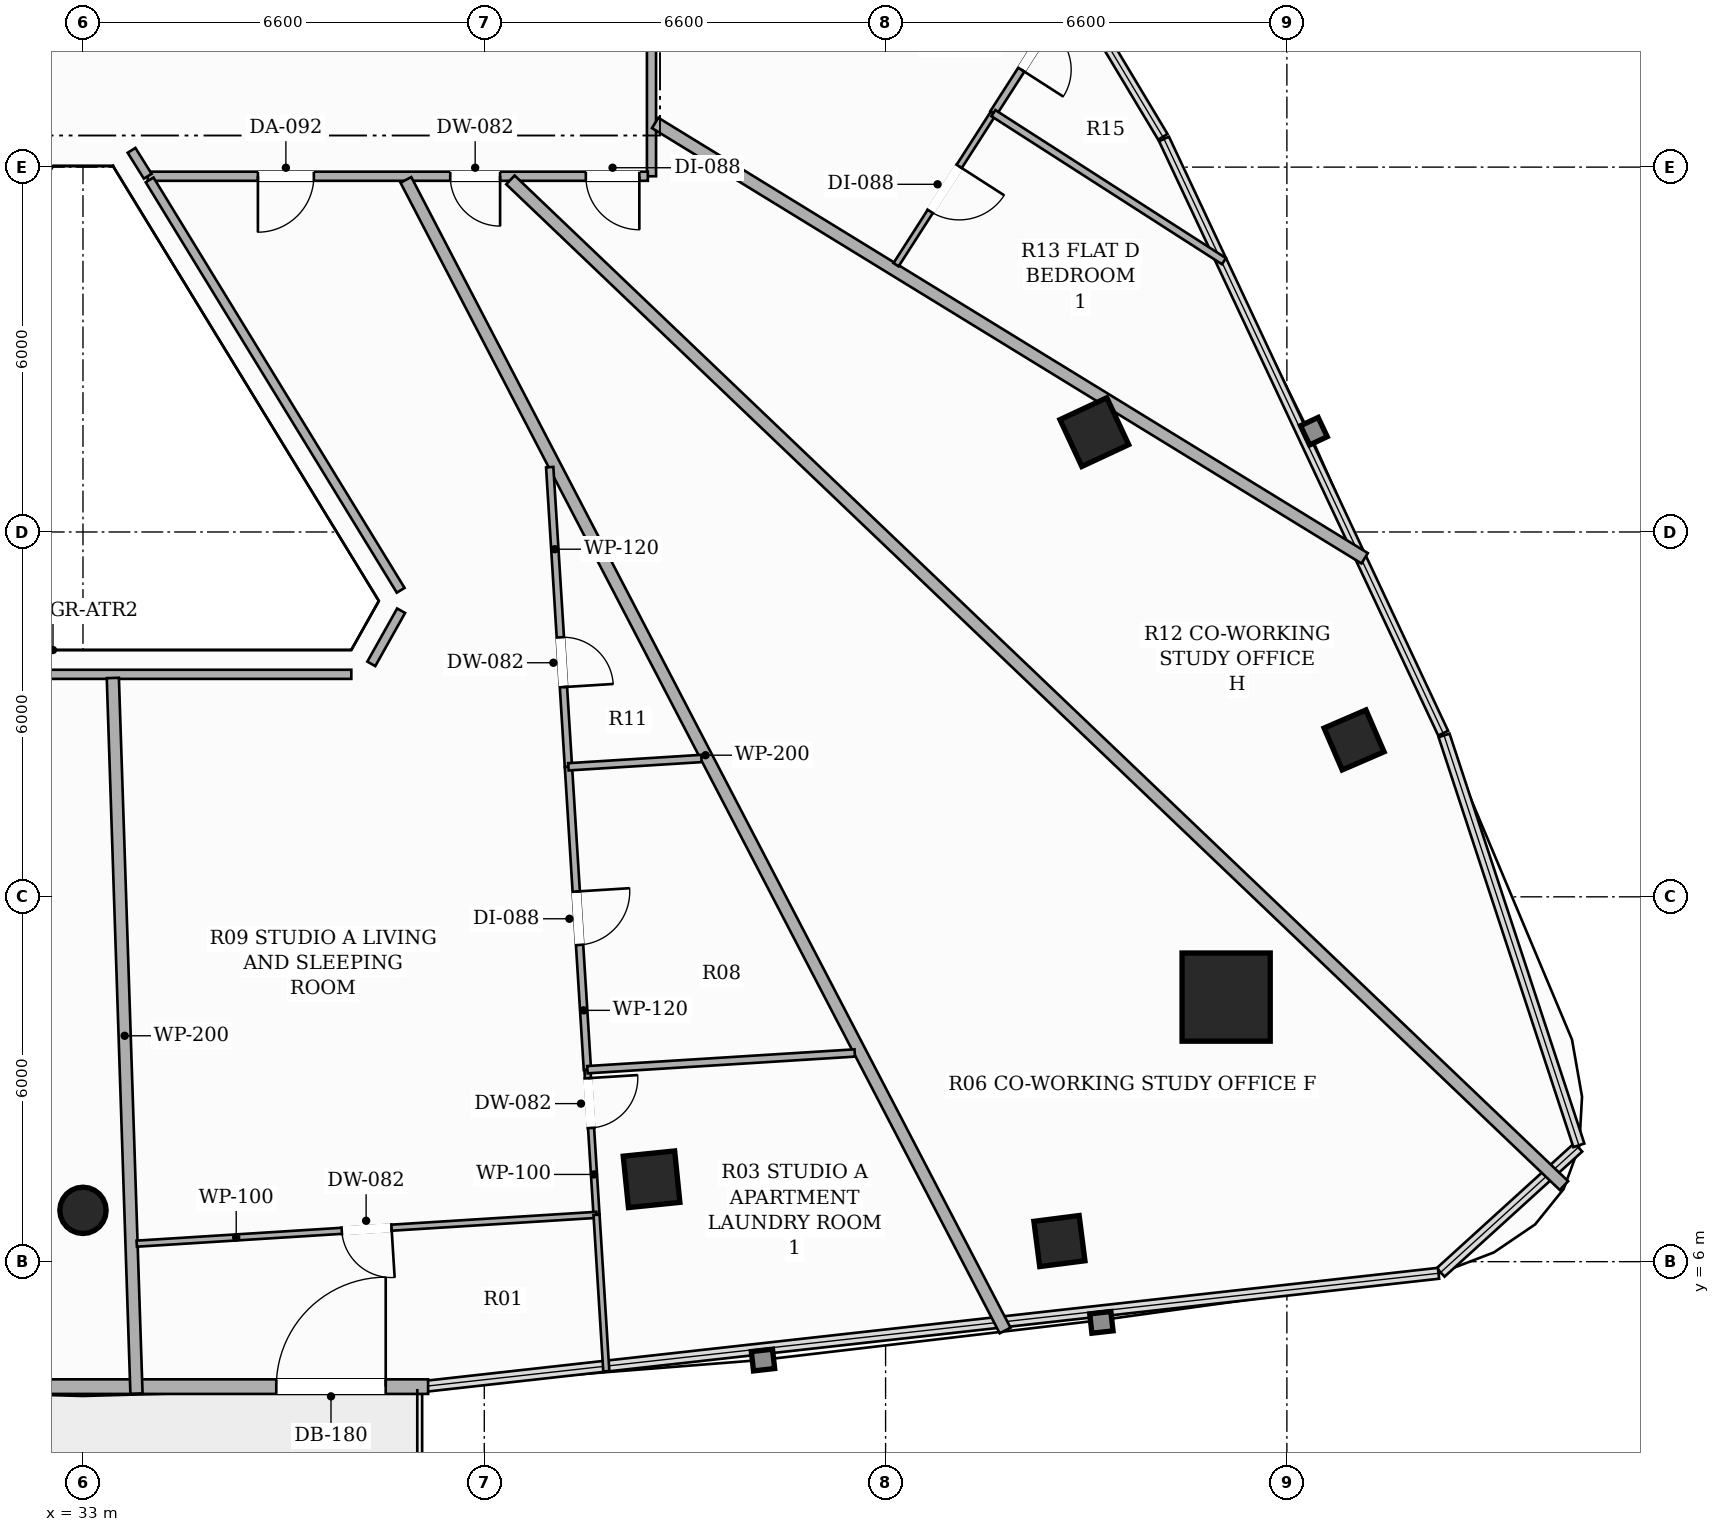
"""IFC4 building model, lengths in metres.
Left out: names, types, materials, properties, quantities, classifications, styles, units other than length and angle.
Written with IfcOpenShell. Run it as: python <this file> out.ifc"""

import sys

from ifc_helpers import new_model, si_unit, direction, frame, frame_2d, origin, origin_2d, place, context, subcontext, project, spatial, rectangle, hollow_rectangle, hollow_circle, extrude, element, fill, save


model = new_model("IFC4")
c1 = context("Model", 3, precision=1e-05, world=origin(), true_north=direction((0.0, 1.0)))
c2 = subcontext(c1, "Body", "Model", "MODEL_VIEW")
j1 = project(units=[si_unit("LENGTHUNIT", "METRE"), si_unit("PLANEANGLEUNIT", "RADIAN")], contexts=[c1])
p1 = place(None, origin())
s1 = spatial("IfcSite", under=j1, at=p1, CompositionType="ELEMENT")
p2 = place(p1, origin())
s2 = spatial("IfcBuilding", under=s1, at=p2, CompositionType="ELEMENT")
p3 = place(p2, frame((0.0, 0.0, 177.05)))
s3 = spatial("IfcBuildingStorey", under=s2, at=p3, CompositionType="ELEMENT", Elevation=177.05)
p4 = place(p3, frame((51.801, 10.351, 0.0), z_axis=(0.0, 0.0, 1.0), x_axis=(1.0, 0.0, 0.0)))
e1 = element("IfcColumn", 1, at=p4, inside=s3, PredefinedType="COLUMN", context=c2, shape_type="SweptSolid", body=[
    extrude(hollow_rectangle(XDim=1.45, YDim=1.45, WallThickness=0.045, at=origin_2d()), origin(), (0.0, 0.0, 1.0), 3.3),
])
p5 = place(p3, frame((33.0, 6.844, 0.0), z_axis=(0.0, 0.0, 1.0), x_axis=(1.0, 0.0, 0.0)))
e2 = element("IfcColumn", 2, at=p5, inside=s3, PredefinedType="COLUMN", context=c2, shape_type="SweptSolid", body=[
    extrude(hollow_circle(Radius=0.381, WallThickness=0.022, at=origin_2d()), origin(), (0.0, 0.0, 1.0), 3.3),
])
for number, where, z_axis, x_axis in (
    (3, (42.351, 7.355, 0.0), (0.0, 0.0, 1.0), (0.995, 0.101, 0.0)),
    (4, (49.633, 19.642, 0.0), (0.0, 0.0, 1.0), (-0.423, 0.906, 0.0)),
):
    element("IfcColumn", number, at=place(p3, frame(where, z_axis=z_axis, x_axis=x_axis)), inside=s3, PredefinedType="COLUMN", context=c2, shape_type="SweptSolid", body=[
        extrude(hollow_rectangle(XDim=0.85, YDim=0.85, WallThickness=0.028, at=origin_2d()), origin(), (0.0, 0.0, 1.0), 3.3),
    ])
for number, where, z_axis, x_axis in (
    (5, (49.059, 6.339, 0.0), (0.0, 0.0, 1.0), (0.992, 0.127, 0.0)),
    (6, (53.905, 14.58, 0.0), (0.0, 0.0, 1.0), (-0.397, 0.918, 0.0)),
):
    element("IfcColumn", number, at=place(p3, frame(where, z_axis=z_axis, x_axis=x_axis)), inside=s3, PredefinedType="COLUMN", context=c2, shape_type="SweptSolid", body=[
        extrude(hollow_rectangle(XDim=0.75, YDim=0.75, WallThickness=0.025, at=origin_2d()), origin(), (0.0, 0.0, 1.0), 3.3),
    ])
p6 = place(p3, frame((27.324, 3.945, 0.0), z_axis=(0.0, 0.0, 1.0), x_axis=(1.0, 0.0, 0.0)))
e7 = element("IfcWall", 7, at=p6, inside=s3, PredefinedType="SOLIDWALL", context=c2, shape_type="SweptSolid", body=[
    extrude(rectangle(XDim=11.352, YDim=0.24, at=frame_2d((5.676, 0.0))), origin(), (0.0, 0.0, 1.0), 2.624),
])
p7 = place(p6, frame((8.855, 0.0, 0.0)))
e8 = element("IfcOpeningElement", 8, at=p7, cuts=e7, PredefinedType="OPENING", context=c2, shape_type="SweptSolid", body=[
    extrude(rectangle(XDim=1.8, YDim=2.2, at=frame_2d((0.9, 1.1))), frame((0.0, 0.13, 0.0), z_axis=(0.0, -1.0, 0.0), x_axis=(1.0, 0.0, 0.0)), (0.0, 0.0, 1.0), 0.26),
])
p8 = place(p3, frame((42.35, 28.34, 0.0), z_axis=(0.0, 0.0, 1.0), x_axis=(0.0, -1.0, 0.0)))
e9 = element("IfcWall", 9, at=p8, inside=s3, PredefinedType="PARTITIONING", context=c2, shape_type="SweptSolid", body=[
    extrude(rectangle(XDim=4.49, YDim=0.15, at=frame_2d((2.245, 0.0))), origin(), (0.0, 0.0, 1.0), 2.721),
])
p9 = place(p8, frame((1.497, 0.0, 0.0)))
e10 = element("IfcOpeningElement", 10, at=p9, cuts=e9, PredefinedType="OPENING", context=c2, shape_type="SweptSolid", body=[
    extrude(rectangle(XDim=0.92, YDim=2.15, at=frame_2d((0.46, 1.075))), frame((0.0, 0.085, 0.0), z_axis=(0.0, -1.0, 0.0), x_axis=(1.0, 0.0, 0.0)), (0.0, 0.0, 1.0), 0.17),
])
p10 = place(p3, frame((42.29, 23.85, 0.0), z_axis=(0.0, 0.0, 1.0), x_axis=(-1.0, 0.0, 0.0)))
e11 = element("IfcWall", 11, at=p10, inside=s3, PredefinedType="PARTITIONING", context=c2, shape_type="SweptSolid", body=[
    extrude(rectangle(XDim=8.225, YDim=0.15, at=frame_2d((4.113, 0.0))), origin(), (0.0, 0.0, 1.0), 2.492),
])
p11 = place(p10, frame((5.493, 0.0, 0.0)))
e12 = element("IfcOpeningElement", 12, at=p11, cuts=e11, PredefinedType="OPENING", context=c2, shape_type="SweptSolid", body=[
    extrude(rectangle(XDim=0.92, YDim=2.15, at=frame_2d((0.46, 1.075))), frame((0.0, 0.085, 0.0), z_axis=(0.0, -1.0, 0.0), x_axis=(1.0, 0.0, 0.0)), (0.0, 0.0, 1.0), 0.17),
])
p12 = place(p10, frame((2.43, 0.0, 0.0)))
e13 = element("IfcOpeningElement", 13, at=p12, cuts=e11, PredefinedType="OPENING", context=c2, shape_type="SweptSolid", body=[
    extrude(rectangle(XDim=0.82, YDim=2.1, at=frame_2d((0.41, 1.05))), frame((0.0, 0.085, 0.0), z_axis=(0.0, -1.0, 0.0), x_axis=(1.0, 0.0, 0.0)), (0.0, 0.0, 1.0), 0.17),
])
p13 = place(p10, frame((0.14, 0.0, 0.0)))
e14 = element("IfcOpeningElement", 14, at=p13, cuts=e11, PredefinedType="OPENING", context=c2, shape_type="SweptSolid", body=[
    extrude(rectangle(XDim=0.88, YDim=2.1, at=frame_2d((0.44, 1.05))), frame((0.0, 0.085, 0.0), z_axis=(0.0, -1.0, 0.0), x_axis=(1.0, 0.0, 0.0)), (0.0, 0.0, 1.0), 0.17),
])
p14 = place(p3, frame((34.065, 23.85, 0.0), z_axis=(0.0, 0.0, 1.0), x_axis=(-0.529649150849, 0.84821682193, 0.0)))
e15 = element("IfcWall", 15, at=p14, inside=s3, PredefinedType="PARTITIONING", context=c2, shape_type="SweptSolid", body=[
    extrude(rectangle(XDim=0.502, YDim=0.15, at=frame_2d((0.251, 0.0))), origin(), (0.0, 0.0, 1.0), 3.06),
])
p15 = place(p3, frame((34.096, 23.79, 0.0), z_axis=(0.0, 0.0, 1.0), x_axis=(0.521886794995, -0.853014755564, 0.0)))
e16 = element("IfcWall", 16, at=p15, inside=s3, PredefinedType="PARTITIONING", context=c2, shape_type="SweptSolid", body=[
    extrude(rectangle(XDim=7.912, YDim=0.15, at=frame_2d((3.956, 0.0))), origin(), (0.0, 0.0, 1.0), 2.721),
])
p16 = place(p3, frame((38.232, 16.705, 0.0), z_axis=(0.0, 0.0, 1.0), x_axis=(-0.489011382175, -0.872277403183, 0.0)))
e17 = element("IfcWall", 17, at=p16, inside=s3, PredefinedType="PARTITIONING", context=c2, shape_type="SweptSolid", body=[
    extrude(rectangle(XDim=1.002, YDim=0.15, at=frame_2d((0.501, 0.0))), origin(), (0.0, 0.0, 1.0), 3.06),
])
p17 = place(p3, frame((37.413, 15.659, 0.0), z_axis=(0.0, 0.0, 1.0), x_axis=(-1.0, 0.0, 0.0)))
e18 = element("IfcWall", 18, at=p17, inside=s3, PredefinedType="PARTITIONING", context=c2, shape_type="SweptSolid", body=[
    extrude(rectangle(XDim=8.826, YDim=0.15, at=frame_2d((4.413, 0.0))), origin(), (0.0, 0.0, 1.0), 2.721),
])
p18 = place(p3, frame((33.88, 3.831, 0.0), z_axis=(0.0, 0.0, 1.0), x_axis=(-0.033030388285, 0.999454347857, 0.0)))
e19 = element("IfcWall", 19, at=p18, inside=s3, PredefinedType="PARTITIONING", context=c2, shape_type="SweptSolid", body=[
    extrude(rectangle(XDim=11.774, YDim=0.2, at=frame_2d((5.887, 0.0))), origin(), (0.0, 0.0, 1.0), 2.413),
])
p19 = place(p3, frame((38.311, 23.79, 0.0), z_axis=(0.0, 0.0, 1.0), x_axis=(0.461923729454, -0.886919651472, 0.0)))
e20 = element("IfcWall", 20, at=p19, inside=s3, PredefinedType="PARTITIONING", context=c2, shape_type="SweptSolid", body=[
    extrude(rectangle(XDim=21.335, YDim=0.2, at=frame_2d((10.667, 0.0))), origin(), (0.0, 0.0, 1.0), 2.413),
])
p20 = place(p3, frame((54.079, 17.567, 0.0), z_axis=(0.0, 0.0, 1.0), x_axis=(-0.852338446262, 0.5229906051, 0.0)))
e21 = element("IfcWall", 21, at=p20, inside=s3, PredefinedType="PARTITIONING", context=c2, shape_type="SweptSolid", body=[
    extrude(rectangle(XDim=13.691, YDim=0.2, at=frame_2d((6.845, 0.0))), origin(), (0.0, 0.0, 1.0), 2.413),
])
p21 = place(p3, frame((40.03, 23.79, 0.0), z_axis=(0.0, 0.0, 1.0), x_axis=(0.723360866179, -0.690470171174, 0.0)))
e22 = element("IfcWall", 22, at=p21, inside=s3, PredefinedType="PARTITIONING", context=c2, shape_type="SweptSolid", body=[
    extrude(rectangle(XDim=23.953, YDim=0.2, at=frame_2d((11.977, 0.0))), origin(), (0.0, 0.0, 1.0), 2.413),
])
p22 = place(p3, frame((40.676, 19.066, 0.0), z_axis=(0.0, 0.0, 1.0), x_axis=(0.062350581346, -0.998054309647, 0.0)))
e23 = element("IfcWall", 23, at=p22, inside=s3, PredefinedType="PARTITIONING", context=c2, shape_type="SweptSolid", body=[
    extrude(rectangle(XDim=4.938, YDim=0.12, at=frame_2d((2.469, 0.0))), origin(), (0.0, 0.0, 1.0), 2.721),
])
p23 = place(p22, frame((2.804, 0.0, 0.0)))
e24 = element("IfcOpeningElement", 24, at=p23, cuts=e23, PredefinedType="OPENING", context=c2, shape_type="SweptSolid", body=[
    extrude(rectangle(XDim=0.82, YDim=2.1, at=frame_2d((0.41, 1.05))), frame((0.0, 0.07, 0.0), z_axis=(0.0, -1.0, 0.0), x_axis=(1.0, 0.0, 0.0)), (0.0, 0.0, 1.0), 0.14),
])
p24 = place(p3, frame((40.984, 14.138, 0.0), z_axis=(0.0, 0.0, 1.0), x_axis=(0.062518380192, -0.998043812735, 0.0)))
e25 = element("IfcWall", 25, at=p24, inside=s3, PredefinedType="PARTITIONING", context=c2, shape_type="SweptSolid", body=[
    extrude(rectangle(XDim=4.991, YDim=0.12, at=frame_2d((2.495, 0.0))), origin(), (0.0, 0.0, 1.0), 2.721),
])
p25 = place(p24, frame((2.055, 0.0, 0.0)))
e26 = element("IfcOpeningElement", 26, at=p25, cuts=e25, PredefinedType="OPENING", context=c2, shape_type="SweptSolid", body=[
    extrude(rectangle(XDim=0.88, YDim=2.1, at=frame_2d((0.44, 1.05))), frame((0.0, 0.07, 0.0), z_axis=(0.0, -1.0, 0.0), x_axis=(1.0, 0.0, 0.0)), (0.0, 0.0, 1.0), 0.14),
])
p26 = place(p3, frame((41.296, 9.157, 0.0), z_axis=(0.0, 0.0, 1.0), x_axis=(0.062778653683, -0.998027474893, 0.0)))
e27 = element("IfcWall", 27, at=p26, inside=s3, PredefinedType="PARTITIONING", context=c2, shape_type="SweptSolid", body=[
    extrude(rectangle(XDim=2.392, YDim=0.1, at=frame_2d((1.196, 0.0))), origin(), (0.0, 0.0, 1.0), 2.413),
])
p27 = place(p26, frame((0.14, 0.0, 0.0)))
e28 = element("IfcOpeningElement", 28, at=p27, cuts=e27, PredefinedType="OPENING", context=c2, shape_type="SweptSolid", body=[
    extrude(rectangle(XDim=0.82, YDim=2.1, at=frame_2d((0.41, 1.05))), frame((0.0, 0.06, 0.0), z_axis=(0.0, -1.0, 0.0), x_axis=(1.0, 0.0, 0.0)), (0.0, 0.0, 1.0), 0.12),
])
p28 = place(p3, frame((41.446, 6.77, 0.0), z_axis=(0.0, 0.0, 1.0), x_axis=(-0.998040272182, -0.062574875979, 0.0)))
e29 = element("IfcWall", 29, at=p28, inside=s3, PredefinedType="PARTITIONING", context=c2, shape_type="SweptSolid", body=[
    extrude(rectangle(XDim=7.577, YDim=0.1, at=frame_2d((3.789, 0.0))), origin(), (0.0, 0.0, 1.0), 3.06),
])
p29 = place(p28, frame((3.378, 0.0, 0.0)))
e30 = element("IfcOpeningElement", 30, at=p29, cuts=e29, PredefinedType="OPENING", context=c2, shape_type="SweptSolid", body=[
    extrude(rectangle(XDim=0.82, YDim=2.1, at=frame_2d((0.41, 1.05))), frame((0.0, 0.06, 0.0), z_axis=(0.0, -1.0, 0.0), x_axis=(1.0, 0.0, 0.0)), (0.0, 0.0, 1.0), 0.12),
])
p30 = place(p3, frame((43.171, 14.275, 0.0), z_axis=(0.0, 0.0, 1.0), x_axis=(-0.998044767373, -0.062503138479, 0.0)))
e31 = element("IfcWall", 31, at=p30, inside=s3, PredefinedType="PARTITIONING", context=c2, shape_type="SweptSolid", body=[
    extrude(rectangle(XDim=2.191, YDim=0.12, at=frame_2d((1.096, 0.0))), origin(), (0.0, 0.0, 1.0), 2.721),
])
p31 = place(p3, frame((45.693, 9.432, 0.0), z_axis=(0.0, 0.0, 1.0), x_axis=(-0.998051500251, -0.062395535466, 0.0)))
e32 = element("IfcWall", 32, at=p31, inside=s3, PredefinedType="PARTITIONING", context=c2, shape_type="SweptSolid", body=[
    extrude(rectangle(XDim=4.406, YDim=0.12, at=frame_2d((2.203, 0.0))), origin(), (0.0, 0.0, 1.0), 2.721),
])
p32 = place(p3, frame((41.607, 4.198, 0.0), z_axis=(0.0, 0.0, 1.0), x_axis=(-0.062431368009, 0.99804925945, 0.0)))
e33 = element("IfcWall", 33, at=p32, inside=s3, PredefinedType="PARTITIONING", context=c2, shape_type="SweptSolid", body=[
    extrude(rectangle(XDim=2.577, YDim=0.1, at=frame_2d((1.289, 0.0))), origin(), (0.0, 0.0, 1.0), 3.06),
])
p33 = place(p3, frame((49.335, 27.008, 0.0), z_axis=(0.0, 0.0, 1.0), x_axis=(-0.540512736599, -0.841335831624, 0.0)))
e34 = element("IfcWall", 34, at=p33, inside=s3, PredefinedType="PARTITIONING", context=c2, shape_type="SweptSolid", body=[
    extrude(rectangle(XDim=2.52, YDim=0.12, at=frame_2d((1.26, 0.0))), origin(), (0.0, 0.0, 1.0), 3.06),
])
p34 = place(p33, frame((0.85, 0.0, 0.0)))
e35 = element("IfcOpeningElement", 35, at=p34, cuts=e34, PredefinedType="OPENING", context=c2, shape_type="SweptSolid", body=[
    extrude(rectangle(XDim=0.82, YDim=2.1, at=frame_2d((0.41, 1.05))), frame((0.0, 0.07, 0.0), z_axis=(0.0, -1.0, 0.0), x_axis=(1.0, 0.0, 0.0)), (0.0, 0.0, 1.0), 0.14),
])
p35 = place(p3, frame((47.973, 24.888, 0.0), z_axis=(0.0, 0.0, 1.0), x_axis=(-0.54033686579, -0.841448793135, 0.0)))
e36 = element("IfcWall", 36, at=p35, inside=s3, PredefinedType="PARTITIONING", context=c2, shape_type="SweptSolid", body=[
    extrude(rectangle(XDim=2.963, YDim=0.1, at=frame_2d((1.481, 0.0))), origin(), (0.0, 0.0, 1.0), 2.413),
])
p36 = place(p35, frame((1.041, 0.0, 0.0)))
e37 = element("IfcOpeningElement", 37, at=p36, cuts=e36, PredefinedType="OPENING", context=c2, shape_type="SweptSolid", body=[
    extrude(rectangle(XDim=0.88, YDim=2.1, at=frame_2d((0.44, 1.05))), frame((0.0, 0.06, 0.0), z_axis=(0.0, -1.0, 0.0), x_axis=(1.0, 0.0, 0.0)), (0.0, 0.0, 1.0), 0.12),
])
p37 = place(p3, frame((51.765, 22.453, 0.0), z_axis=(0.0, 0.0, 1.0), x_axis=(-0.841445922542, 0.540341336044, 0.0)))
e38 = element("IfcWall", 38, at=p37, inside=s3, PredefinedType="PARTITIONING", context=c2, shape_type="SweptSolid", body=[
    extrude(rectangle(XDim=4.507, YDim=0.12, at=frame_2d((2.253, 0.0))), origin(), (0.0, 0.0, 1.0), 3.06),
])
p38 = place(p7, origin())
e39 = element("IfcDoor", 39, at=p38, inside=s3, OperationType="SINGLE_SWING_RIGHT", PredefinedType="DOOR", context=c2, shape_type="SweptSolid", body=[
    extrude(rectangle(XDim=1.8, YDim=2.2, at=frame_2d((0.9, 1.1))), frame((0.0, 0.025, 0.0), z_axis=(0.0, -1.0, 0.0), x_axis=(1.0, 0.0, 0.0)), (0.0, 0.0, 1.0), 0.05),
])
fill(e8, e39)
p39 = place(p11, origin())
e40 = element("IfcDoor", 40, at=p39, inside=s3, OperationType="SINGLE_SWING_RIGHT", PredefinedType="DOOR", context=c2, shape_type="SweptSolid", body=[
    extrude(rectangle(XDim=0.92, YDim=2.15, at=frame_2d((0.46, 1.075))), frame((0.0, 0.025, 0.0), z_axis=(0.0, -1.0, 0.0), x_axis=(1.0, 0.0, 0.0)), (0.0, 0.0, 1.0), 0.05),
])
fill(e12, e40)
p40 = place(p23, origin())
e41 = element("IfcDoor", 41, at=p40, inside=s3, OperationType="SINGLE_SWING_RIGHT", PredefinedType="DOOR", context=c2, shape_type="SweptSolid", body=[
    extrude(rectangle(XDim=0.82, YDim=2.1, at=frame_2d((0.41, 1.05))), frame((0.0, 0.025, 0.0), z_axis=(0.0, -1.0, 0.0), x_axis=(1.0, 0.0, 0.0)), (0.0, 0.0, 1.0), 0.05),
])
fill(e24, e41)
p41 = place(p25, origin())
e42 = element("IfcDoor", 42, at=p41, inside=s3, OperationType="SINGLE_SWING_LEFT", PredefinedType="DOOR", context=c2, shape_type="SweptSolid", body=[
    extrude(rectangle(XDim=0.88, YDim=2.1, at=frame_2d((0.44, 1.05))), frame((0.0, 0.025, 0.0), z_axis=(0.0, -1.0, 0.0), x_axis=(1.0, 0.0, 0.0)), (0.0, 0.0, 1.0), 0.05),
])
fill(e26, e42)
p42 = place(p27, origin())
e43 = element("IfcDoor", 43, at=p42, inside=s3, OperationType="SINGLE_SWING_LEFT", PredefinedType="DOOR", context=c2, shape_type="SweptSolid", body=[
    extrude(rectangle(XDim=0.82, YDim=2.1, at=frame_2d((0.41, 1.05))), frame((0.0, 0.025, 0.0), z_axis=(0.0, -1.0, 0.0), x_axis=(1.0, 0.0, 0.0)), (0.0, 0.0, 1.0), 0.05),
])
fill(e28, e43)
p43 = place(p29, origin())
e44 = element("IfcDoor", 44, at=p43, inside=s3, OperationType="SINGLE_SWING_LEFT", PredefinedType="DOOR", context=c2, shape_type="SweptSolid", body=[
    extrude(rectangle(XDim=0.82, YDim=2.1, at=frame_2d((0.41, 1.05))), frame((0.0, 0.025, 0.0), z_axis=(0.0, -1.0, 0.0), x_axis=(1.0, 0.0, 0.0)), (0.0, 0.0, 1.0), 0.05),
])
fill(e30, e44)
p44 = place(p34, origin())
e45 = element("IfcDoor", 45, at=p44, inside=s3, OperationType="SINGLE_SWING_RIGHT", PredefinedType="DOOR", context=c2, shape_type="SweptSolid", body=[
    extrude(rectangle(XDim=0.82, YDim=2.1, at=frame_2d((0.41, 1.05))), frame((0.0, 0.025, 0.0), z_axis=(0.0, -1.0, 0.0), x_axis=(1.0, 0.0, 0.0)), (0.0, 0.0, 1.0), 0.05),
])
fill(e35, e45)
p45 = place(p36, origin())
e46 = element("IfcDoor", 46, at=p45, inside=s3, OperationType="SINGLE_SWING_LEFT", PredefinedType="DOOR", context=c2, shape_type="SweptSolid", body=[
    extrude(rectangle(XDim=0.88, YDim=2.1, at=frame_2d((0.44, 1.05))), frame((0.0, 0.025, 0.0), z_axis=(0.0, -1.0, 0.0), x_axis=(1.0, 0.0, 0.0)), (0.0, 0.0, 1.0), 0.05),
])
fill(e37, e46)
p46 = place(p12, origin())
e47 = element("IfcDoor", 47, at=p46, inside=s3, OperationType="SINGLE_SWING_LEFT", PredefinedType="DOOR", context=c2, shape_type="SweptSolid", body=[
    extrude(rectangle(XDim=0.82, YDim=2.1, at=frame_2d((0.41, 1.05))), frame((0.0, 0.025, 0.0), z_axis=(0.0, -1.0, 0.0), x_axis=(1.0, 0.0, 0.0)), (0.0, 0.0, 1.0), 0.05),
])
fill(e13, e47)
p47 = place(p13, origin())
e48 = element("IfcDoor", 48, at=p47, inside=s3, OperationType="SINGLE_SWING_LEFT", PredefinedType="DOOR", context=c2, shape_type="SweptSolid", body=[
    extrude(rectangle(XDim=0.88, YDim=2.1, at=frame_2d((0.44, 1.05))), frame((0.0, 0.025, 0.0), z_axis=(0.0, -1.0, 0.0), x_axis=(1.0, 0.0, 0.0)), (0.0, 0.0, 1.0), 0.05),
])
fill(e14, e48)
save(model, sys.argv[1])
